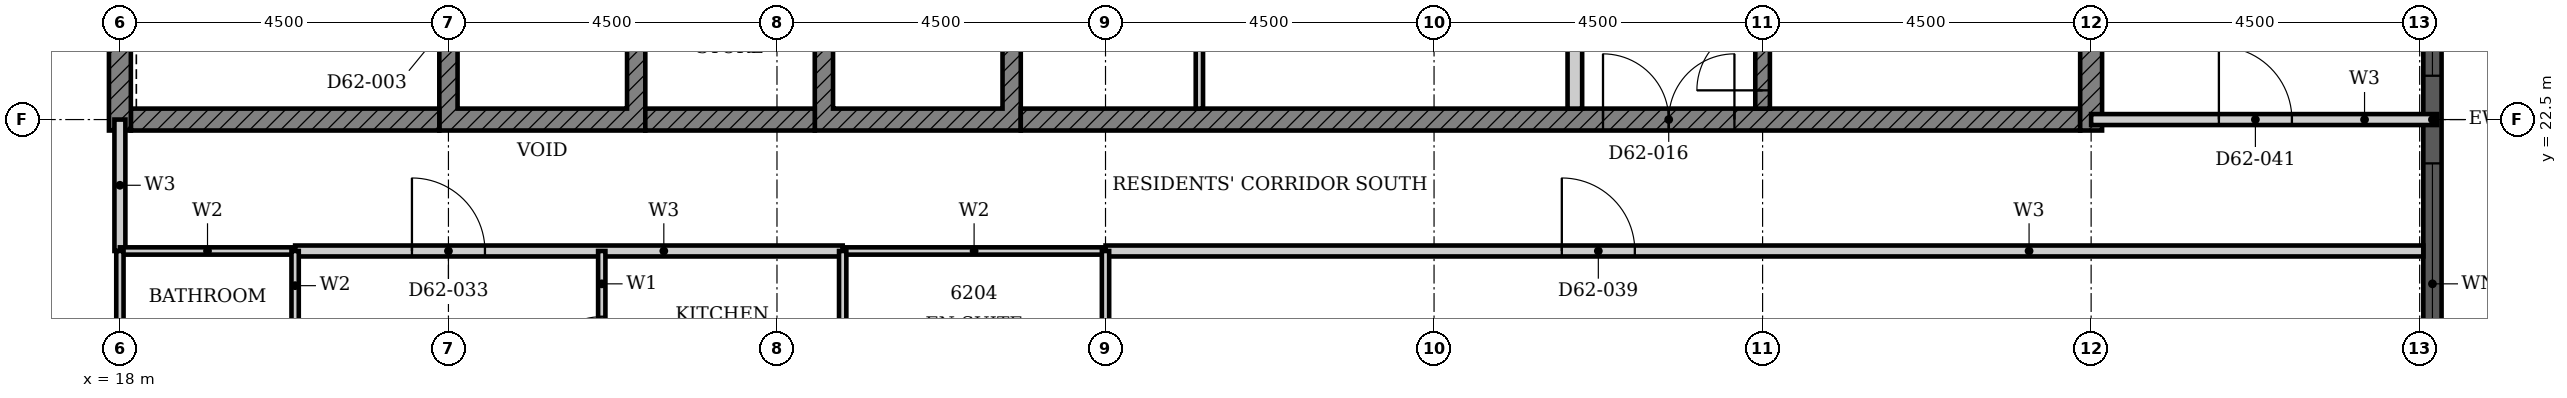
"""IFC4 building model, lengths in metres.
Left out: names, types, materials, properties, quantities, classifications, styles, units other than length and angle.
Written with IfcOpenShell. Run it as: python <this file> out.ifc"""

import sys

from ifc_helpers import new_model, si_unit, direction, frame, frame_2d, origin, place, context, subcontext, project, spatial, polyline, rectangle, outline, extrude, element, fill, save


model = new_model("IFC4")
c1 = context("Model", 3, precision=1e-05, world=origin(), true_north=direction((0.0, 1.0)))
c2 = subcontext(c1, "Body", "Model", "MODEL_VIEW")
j1 = project(units=[si_unit("LENGTHUNIT", "METRE"), si_unit("PLANEANGLEUNIT", "RADIAN")], contexts=[c1])
p1 = place(None, origin())
s1 = spatial("IfcSite", under=j1, at=p1, CompositionType="ELEMENT")
p2 = place(p1, origin())
s2 = spatial("IfcBuilding", under=s1, at=p2, CompositionType="ELEMENT")
p3 = place(p2, frame((0.0, 0.0, 245.3)))
s3 = spatial("IfcBuildingStorey", under=s2, at=p3, CompositionType="ELEMENT", Elevation=245.3)
p4 = place(p3, frame((49.675, 18.3, 0.0), z_axis=(0.0, 0.0, 1.0), x_axis=(0.0, 1.0, 0.0)))
e1 = element("IfcWall", 1, at=p4, inside=s3, PredefinedType="SOLIDWALL", context=c2, shape_type="SweptSolid", body=[
    extrude(rectangle(XDim=8.4, YDim=0.25, at=frame_2d((4.2, 0.0))), origin(), (0.0, 0.0, 1.0), 3.7),
])
p5 = place(p4, frame((0.3, 0.0, 0.45)))
e2 = element("IfcOpeningElement", 2, at=p5, cuts=e1, PredefinedType="OPENING", context=c2, shape_type="SweptSolid", body=[
    extrude(rectangle(XDim=3.3, YDim=2.3, at=frame_2d((1.65, 1.15))), frame((0.0, 0.135, 0.0), z_axis=(0.0, -1.0, 0.0), x_axis=(1.0, 0.0, 0.0)), (0.0, 0.0, 1.0), 0.27),
])
p6 = place(p4, frame((4.8, 0.0, 0.45)))
e3 = element("IfcOpeningElement", 3, at=p6, cuts=e1, PredefinedType="OPENING", context=c2, shape_type="SweptSolid", body=[
    extrude(rectangle(XDim=3.3, YDim=2.3, at=frame_2d((1.65, 1.15))), frame((0.0, 0.135, 0.0), z_axis=(0.0, -1.0, 0.0), x_axis=(1.0, 0.0, 0.0)), (0.0, 0.0, 1.0), 0.27),
])
p7 = place(p3, origin())
e4 = element("IfcWall", 4, at=p7, inside=s3, PredefinedType="SHEAR", context=c2, shape_type="SweptSolid", body=[
    extrude(outline(polyline([(22.375, 22.35), (25.197, 22.35), (25.197, 25.275), (24.947, 25.275), (24.947, 22.65), (22.625, 22.65), (22.625, 25.275), (22.375, 25.275), (22.375, 22.35)])), origin(), (0.0, 0.0, 1.0), 3.4),
])
p8 = place(p3, origin())
e5 = element("IfcWall", 5, at=p8, inside=s3, PredefinedType="SHEAR", context=c2, shape_type="SweptSolid", body=[
    extrude(outline(polyline([(27.518, 22.35), (30.339, 22.35), (30.339, 25.275), (30.089, 25.275), (30.089, 22.65), (27.768, 22.65), (27.768, 25.275), (27.518, 25.275), (27.518, 22.35)])), origin(), (0.0, 0.0, 1.0), 3.4),
])
p9 = place(p3, frame((18.15, 22.5, 0.0), z_axis=(0.0, 0.0, 1.0), x_axis=(1.0, 0.0, 0.0)))
e6 = element("IfcWall", 6, at=p9, inside=s3, PredefinedType="SHEAR", context=c2, shape_type="SweptSolid", body=[
    extrude(rectangle(XDim=4.225, YDim=0.3, at=frame_2d((2.113, 0.0))), origin(), (0.0, 0.0, 1.0), 3.4),
])
p10 = place(p3, frame((25.197, 22.5, 0.0), z_axis=(0.0, 0.0, 1.0), x_axis=(1.0, 0.0, 0.0)))
e7 = element("IfcWall", 7, at=p10, inside=s3, PredefinedType="SHEAR", context=c2, shape_type="SweptSolid", body=[
    extrude(rectangle(XDim=2.321, YDim=0.3, at=frame_2d((1.161, 0.0))), origin(), (0.0, 0.0, 1.0), 3.4),
])
p11 = place(p3, frame((30.339, 22.5, 0.0), z_axis=(0.0, 0.0, 1.0), x_axis=(1.0, 0.0, 0.0)))
e8 = element("IfcWall", 8, at=p11, inside=s3, PredefinedType="SHEAR", context=c2, shape_type="SweptSolid", body=[
    extrude(rectangle(XDim=14.511, YDim=0.3, at=frame_2d((7.255, 0.0))), origin(), (0.0, 0.0, 1.0), 3.4),
])
p12 = place(p11, frame((7.975, 0.0, 0.0)))
e9 = element("IfcOpeningElement", 9, at=p12, cuts=e8, PredefinedType="OPENING", context=c2, shape_type="SweptSolid", body=[
    extrude(rectangle(XDim=1.8, YDim=2.1, at=frame_2d((0.9, 1.05))), frame((0.0, 0.16, 0.0), z_axis=(0.0, -1.0, 0.0), x_axis=(1.0, 0.0, 0.0)), (0.0, 0.0, 1.0), 0.32),
])
for number, where, z_axis, x_axis in (
    (10, (18.0, 22.35, 0.0), (0.0, 0.0, 1.0), (0.0, 1.0, 0.0)),
    (11, (45.0, 22.35, 0.0), (0.0, 0.0, 1.0), (0.0, 1.0, 0.0)),
):
    element("IfcWall", number, at=place(p3, frame(where, z_axis=z_axis, x_axis=x_axis)), inside=s3, PredefinedType="SHEAR", context=c2, shape_type="SweptSolid", body=[
        extrude(rectangle(XDim=9.3, YDim=0.3, at=frame_2d((4.65, 0.0))), origin(), (0.0, 0.0, 1.0), 3.4),
    ])
p13 = place(p3, frame((37.928, 22.65, 0.0), z_axis=(0.0, 0.0, 1.0), x_axis=(0.0, 1.0, 0.0)))
e12 = element("IfcWall", 12, at=p13, inside=s3, PredefinedType="PARTITIONING", context=c2, shape_type="SweptSolid", body=[
    extrude(rectangle(XDim=2.625, YDim=0.2, at=frame_2d((1.312, 0.0))), origin(), (0.0, 0.0, 1.0), 3.4),
])
p14 = place(p3, frame((32.786, 22.65, 0.0), z_axis=(0.0, 0.0, 1.0), x_axis=(0.0, 1.0, 0.0)))
e13 = element("IfcWall", 13, at=p14, inside=s3, PredefinedType="PARTITIONING", context=c2, shape_type="SweptSolid", body=[
    extrude(rectangle(XDim=2.625, YDim=0.1, at=frame_2d((1.312, 0.0))), origin(), (0.0, 0.0, 1.0), 3.4),
])
p15 = place(p3, frame((40.5, 22.65, 0.0), z_axis=(0.0, 0.0, 1.0), x_axis=(0.0, 1.0, 0.0)))
e14 = element("IfcWall", 14, at=p15, inside=s3, PredefinedType="SHEAR", context=c2, shape_type="SweptSolid", body=[
    extrude(rectangle(XDim=5.825, YDim=0.2, at=frame_2d((2.913, 0.0))), origin(), (0.0, 0.0, 1.0), 3.4),
])
p16 = place(p15, frame((0.25, 0.0, 0.0)))
e15 = element("IfcOpeningElement", 15, at=p16, cuts=e14, PredefinedType="OPENING", context=c2, shape_type="SweptSolid", body=[
    extrude(rectangle(XDim=1.8, YDim=2.1, at=frame_2d((0.9, 1.05))), frame((0.0, 0.11, 0.0), z_axis=(0.0, -1.0, 0.0), x_axis=(1.0, 0.0, 0.0)), (0.0, 0.0, 1.0), 0.22),
])
p17 = place(p3, frame((20.4, 20.7, 0.0), z_axis=(0.0, 0.0, 1.0), x_axis=(1.0, 0.0, 0.0)))
e16 = element("IfcWall", 16, at=p17, inside=s3, PredefinedType="PARTITIONING", context=c2, shape_type="SweptSolid", body=[
    extrude(rectangle(XDim=7.5, YDim=0.15, at=frame_2d((3.75, 0.0))), origin(), (0.0, 0.0, 1.0), 3.4),
])
p18 = place(p17, frame((1.6, 0.0, 0.0)))
e17 = element("IfcOpeningElement", 17, at=p18, cuts=e16, PredefinedType="OPENING", context=c2, shape_type="SweptSolid", body=[
    extrude(rectangle(XDim=1.0, YDim=2.2, at=frame_2d((0.5, 1.1))), frame((0.0, 0.085, 0.0), z_axis=(0.0, -1.0, 0.0), x_axis=(1.0, 0.0, 0.0)), (0.0, 0.0, 1.0), 0.17),
])
p19 = place(p3, frame((31.5, 20.7, 0.0), z_axis=(0.0, 0.0, 1.0), x_axis=(1.0, 0.0, 0.0)))
e18 = element("IfcWall", 18, at=p19, inside=s3, PredefinedType="PARTITIONING", context=c2, shape_type="SweptSolid", body=[
    extrude(rectangle(XDim=18.05, YDim=0.15, at=frame_2d((9.025, 0.0))), origin(), (0.0, 0.0, 1.0), 3.4),
])
p20 = place(p19, frame((6.25, 0.0, 0.0)))
e19 = element("IfcOpeningElement", 19, at=p20, cuts=e18, PredefinedType="OPENING", context=c2, shape_type="SweptSolid", body=[
    extrude(rectangle(XDim=1.0, YDim=2.1, at=frame_2d((0.5, 1.05))), frame((0.0, 0.085, 0.0), z_axis=(0.0, -1.0, 0.0), x_axis=(1.0, 0.0, 0.0)), (0.0, 0.0, 1.0), 0.17),
])
p21 = place(p3, frame((45.0, 22.5, 0.0), z_axis=(0.0, 0.0, 1.0), x_axis=(1.0, 0.0, 0.0)))
e20 = element("IfcWall", 20, at=p21, inside=s3, PredefinedType="PARTITIONING", context=c2, shape_type="SweptSolid", body=[
    extrude(rectangle(XDim=4.74, YDim=0.15, at=frame_2d((2.37, 0.0))), origin(), (0.0, 0.0, 1.0), 3.4),
])
p22 = place(p21, frame((1.75, 0.0, 0.0)))
e21 = element("IfcOpeningElement", 21, at=p22, cuts=e20, PredefinedType="OPENING", context=c2, shape_type="SweptSolid", body=[
    extrude(rectangle(XDim=1.0, YDim=2.2, at=frame_2d((0.5, 1.1))), frame((0.0, 0.085, 0.0), z_axis=(0.0, -1.0, 0.0), x_axis=(1.0, 0.0, 0.0)), (0.0, 0.0, 1.0), 0.17),
])
p23 = place(p3, frame((18.0, 20.7, 0.0), z_axis=(0.0, 0.0, 1.0), x_axis=(0.0, 1.0, 0.0)))
e22 = element("IfcWall", 22, at=p23, inside=s3, PredefinedType="PARTITIONING", context=c2, shape_type="SweptSolid", body=[
    extrude(rectangle(XDim=1.8, YDim=0.15, at=frame_2d((0.9, 0.0))), origin(), (0.0, 0.0, 1.0), 3.4),
])
p24 = place(p3, frame((24.6, 18.0, 0.0), z_axis=(0.0, 0.0, 1.0), x_axis=(0.0, 1.0, 0.0)))
e23 = element("IfcWall", 23, at=p24, inside=s3, PredefinedType="PARTITIONING", context=c2, shape_type="SweptSolid", body=[
    extrude(rectangle(XDim=2.7, YDim=0.1, at=frame_2d((1.35, 0.0))), origin(), (0.0, 0.0, 1.0), 3.4),
])
p25 = place(p24, frame((0.9, 0.0, 0.0)))
e24 = element("IfcOpeningElement", 24, at=p25, cuts=e23, PredefinedType="OPENING", context=c2, shape_type="SweptSolid", body=[
    extrude(rectangle(XDim=0.9, YDim=2.1, at=frame_2d((0.45, 1.05))), frame((0.0, 0.06, 0.0), z_axis=(0.0, -1.0, 0.0), x_axis=(1.0, 0.0, 0.0)), (0.0, 0.0, 1.0), 0.12),
])
p26 = place(p3, frame((18.0, 20.7, 0.0), z_axis=(0.0, 0.0, 1.0), x_axis=(1.0, 0.0, 0.0)))
e25 = element("IfcWall", 25, at=p26, inside=s3, PredefinedType="PARTITIONING", context=c2, shape_type="SweptSolid", body=[
    extrude(rectangle(XDim=2.4, YDim=0.1, at=frame_2d((1.2, 0.0))), origin(), (0.0, 0.0, 1.0), 3.4),
])
p27 = place(p3, frame((27.9, 20.7, 0.0), z_axis=(0.0, 0.0, 1.0), x_axis=(1.0, 0.0, 0.0)))
e26 = element("IfcWall", 26, at=p27, inside=s3, PredefinedType="PARTITIONING", context=c2, shape_type="SweptSolid", body=[
    extrude(rectangle(XDim=3.6, YDim=0.1, at=frame_2d((1.8, 0.0))), origin(), (0.0, 0.0, 1.0), 3.4),
])
p28 = place(p3, frame((18.0, 18.0, 0.0), z_axis=(0.0, 0.0, 1.0), x_axis=(0.0, 1.0, 0.0)))
e27 = element("IfcWall", 27, at=p28, inside=s3, PredefinedType="PARTITIONING", context=c2, shape_type="SweptSolid", body=[
    extrude(rectangle(XDim=2.7, YDim=0.1, at=frame_2d((1.35, 0.0))), origin(), (0.0, 0.0, 1.0), 3.4),
])
p29 = place(p3, frame((20.4, 18.0, 0.0), z_axis=(0.0, 0.0, 1.0), x_axis=(0.0, 1.0, 0.0)))
e28 = element("IfcWall", 28, at=p29, inside=s3, PredefinedType="PARTITIONING", context=c2, shape_type="SweptSolid", body=[
    extrude(rectangle(XDim=2.7, YDim=0.1, at=frame_2d((1.35, 0.0))), origin(), (0.0, 0.0, 1.0), 3.4),
])
p30 = place(p29, frame((0.95, 0.0, 0.0)))
e29 = element("IfcOpeningElement", 29, at=p30, cuts=e28, PredefinedType="OPENING", context=c2, shape_type="SweptSolid", body=[
    extrude(rectangle(XDim=0.8, YDim=2.1, at=frame_2d((0.4, 1.05))), frame((0.0, 0.06, 0.0), z_axis=(0.0, -1.0, 0.0), x_axis=(1.0, 0.0, 0.0)), (0.0, 0.0, 1.0), 0.12),
])
for number, where, z_axis, x_axis in (
    (30, (27.9, 18.0, 0.0), (0.0, 0.0, 1.0), (0.0, 1.0, 0.0)),
    (31, (31.5, 18.0, 0.0), (0.0, 0.0, 1.0), (0.0, 1.0, 0.0)),
):
    element("IfcWall", number, at=place(p3, frame(where, z_axis=z_axis, x_axis=x_axis)), inside=s3, PredefinedType="PARTITIONING", context=c2, shape_type="SweptSolid", body=[
        extrude(rectangle(XDim=2.7, YDim=0.1, at=frame_2d((1.35, 0.0))), origin(), (0.0, 0.0, 1.0), 3.4),
    ])
p31 = place(p5, origin())
e32 = element("IfcWindow", 32, at=p31, inside=s3, PartitioningType="SINGLE_PANEL", PredefinedType="WINDOW", context=c2, shape_type="SweptSolid", body=[
    extrude(rectangle(XDim=3.3, YDim=2.3, at=frame_2d((1.65, 1.15))), frame((0.0, 0.03, 0.0), z_axis=(0.0, -1.0, 0.0), x_axis=(1.0, 0.0, 0.0)), (0.0, 0.0, 1.0), 0.06),
])
fill(e2, e32)
p32 = place(p6, origin())
e33 = element("IfcWindow", 33, at=p32, inside=s3, PartitioningType="SINGLE_PANEL", PredefinedType="WINDOW", context=c2, shape_type="SweptSolid", body=[
    extrude(rectangle(XDim=3.3, YDim=2.3, at=frame_2d((1.65, 1.15))), frame((0.0, 0.03, 0.0), z_axis=(0.0, -1.0, 0.0), x_axis=(1.0, 0.0, 0.0)), (0.0, 0.0, 1.0), 0.06),
])
fill(e3, e33)
p33 = place(p16, origin())
e34 = element("IfcDoor", 34, at=p33, inside=s3, OperationType="DOUBLE_DOOR_SINGLE_SWING", PredefinedType="DOOR", context=c2, shape_type="SweptSolid", body=[
    extrude(rectangle(XDim=1.8, YDim=2.1, at=frame_2d((0.9, 1.05))), frame((0.0, 0.025, 0.0), z_axis=(0.0, -1.0, 0.0), x_axis=(1.0, 0.0, 0.0)), (0.0, 0.0, 1.0), 0.05),
])
fill(e15, e34)
p34 = place(p12, origin())
e35 = element("IfcDoor", 35, at=p34, inside=s3, OperationType="DOUBLE_DOOR_SINGLE_SWING", PredefinedType="DOOR", context=c2, shape_type="SweptSolid", body=[
    extrude(rectangle(XDim=1.8, YDim=2.1, at=frame_2d((0.9, 1.05))), frame((0.0, 0.025, 0.0), z_axis=(0.0, -1.0, 0.0), x_axis=(1.0, 0.0, 0.0)), (0.0, 0.0, 1.0), 0.05),
])
fill(e9, e35)
p35 = place(p18, origin())
e36 = element("IfcDoor", 36, at=p35, inside=s3, OperationType="SINGLE_SWING_RIGHT", PredefinedType="DOOR", context=c2, shape_type="SweptSolid", body=[
    extrude(rectangle(XDim=1.0, YDim=2.2, at=frame_2d((0.5, 1.1))), frame((0.0, 0.025, 0.0), z_axis=(0.0, -1.0, 0.0), x_axis=(1.0, 0.0, 0.0)), (0.0, 0.0, 1.0), 0.05),
])
fill(e17, e36)
p36 = place(p25, origin())
e37 = element("IfcDoor", 37, at=p36, inside=s3, OperationType="SINGLE_SWING_LEFT", PredefinedType="DOOR", context=c2, shape_type="SweptSolid", body=[
    extrude(rectangle(XDim=0.9, YDim=2.1, at=frame_2d((0.45, 1.05))), frame((0.0, 0.025, 0.0), z_axis=(0.0, -1.0, 0.0), x_axis=(1.0, 0.0, 0.0)), (0.0, 0.0, 1.0), 0.05),
])
fill(e24, e37)
p37 = place(p20, origin())
e38 = element("IfcDoor", 38, at=p37, inside=s3, OperationType="SINGLE_SWING_LEFT", PredefinedType="DOOR", context=c2, shape_type="SweptSolid", body=[
    extrude(rectangle(XDim=1.0, YDim=2.1, at=frame_2d((0.5, 1.05))), frame((0.0, 0.025, 0.0), z_axis=(0.0, -1.0, 0.0), x_axis=(1.0, 0.0, 0.0)), (0.0, 0.0, 1.0), 0.05),
])
fill(e19, e38)
p38 = place(p22, origin())
e39 = element("IfcDoor", 39, at=p38, inside=s3, OperationType="SINGLE_SWING_LEFT", PredefinedType="DOOR", context=c2, shape_type="SweptSolid", body=[
    extrude(rectangle(XDim=1.0, YDim=2.2, at=frame_2d((0.5, 1.1))), frame((0.0, 0.025, 0.0), z_axis=(0.0, -1.0, 0.0), x_axis=(1.0, 0.0, 0.0)), (0.0, 0.0, 1.0), 0.05),
])
fill(e21, e39)
save(model, sys.argv[1])
